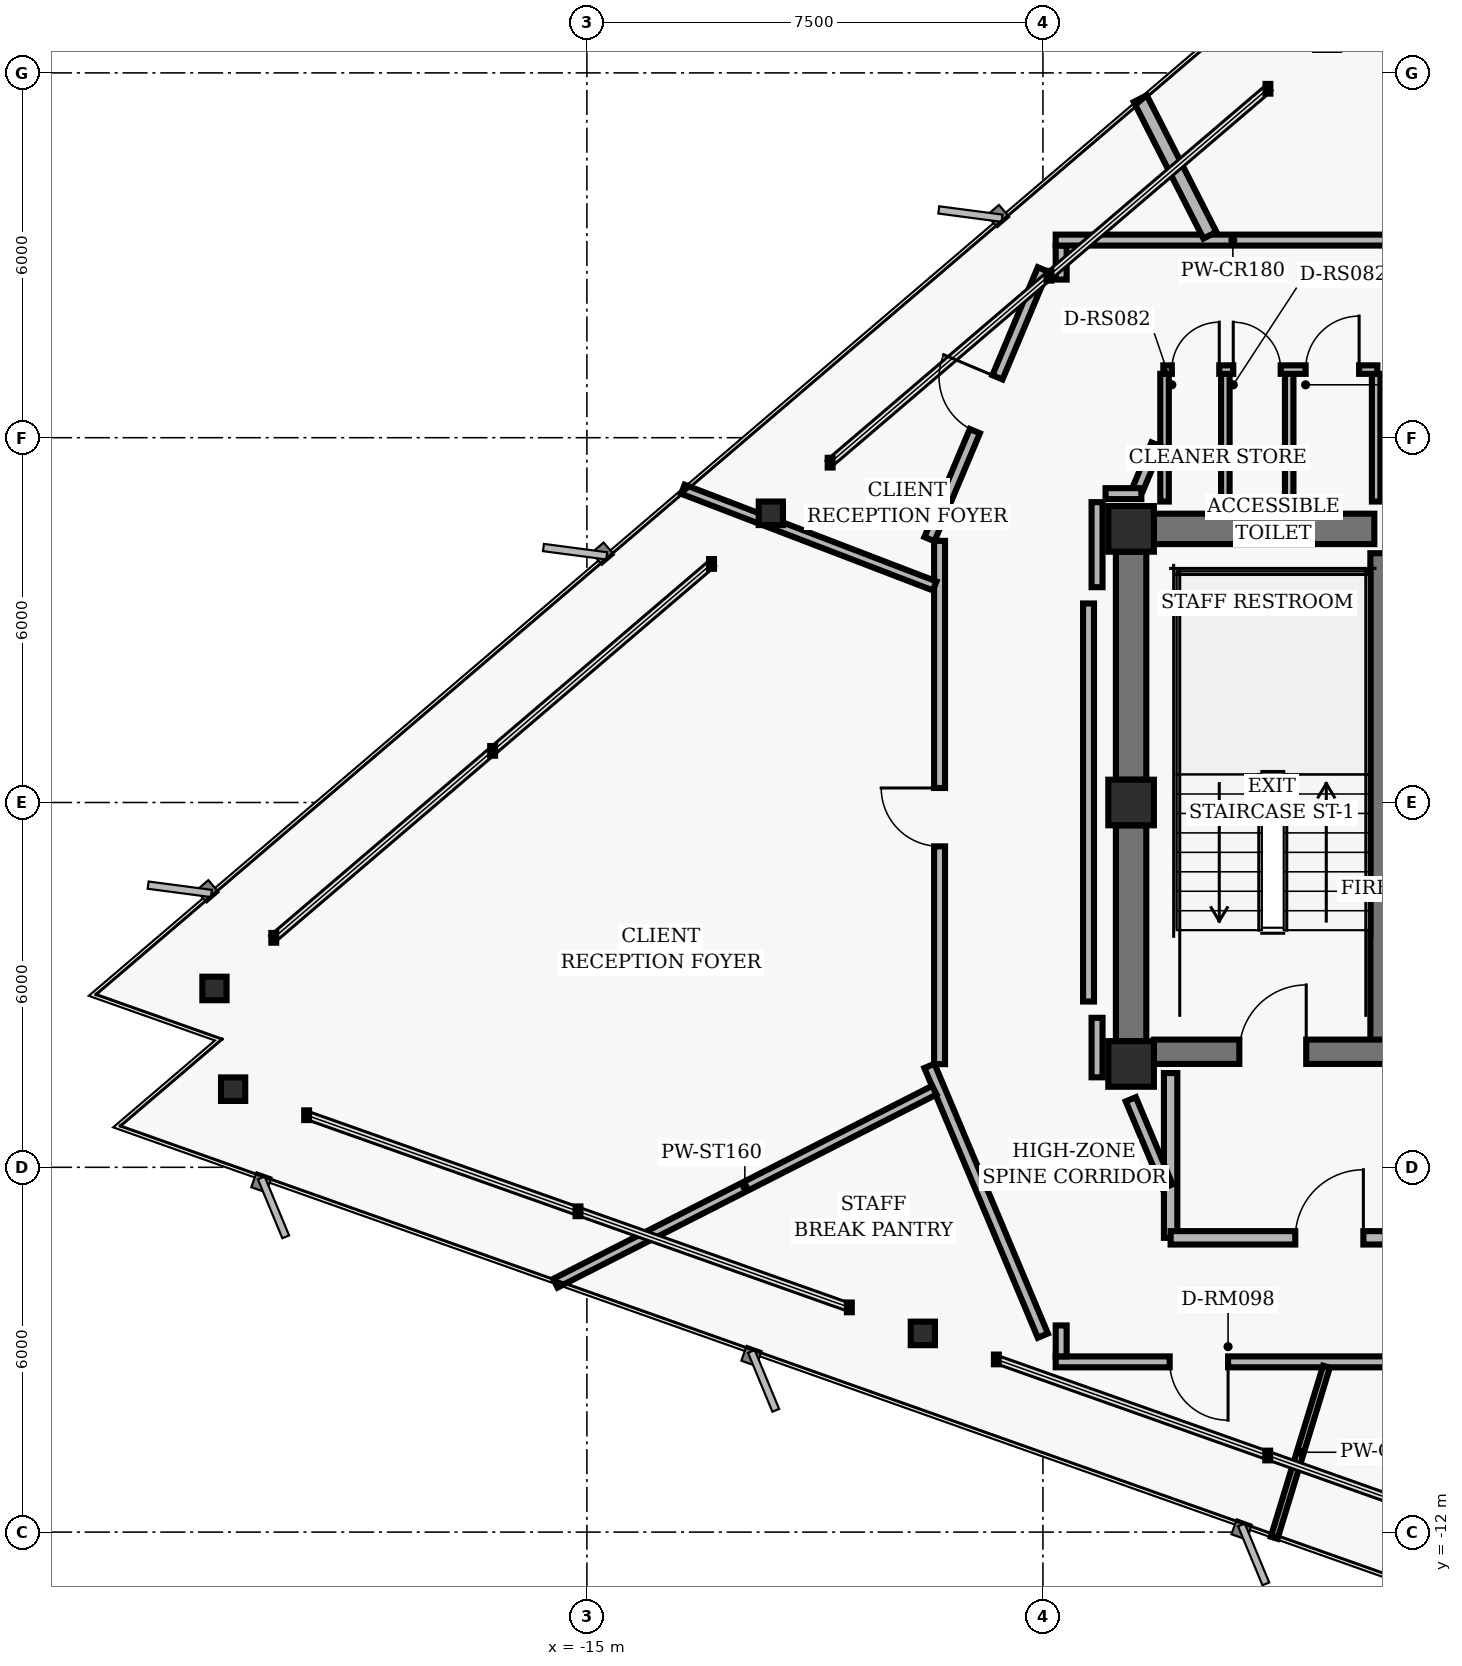
"""IFC4 building model, lengths in metres.
Left out: names, types, materials, properties, quantities, classifications, styles, units other than length and angle.
Written with IfcOpenShell. Run it as: python <this file> out.ifc"""

import sys

from ifc_helpers import new_model, si_unit, direction, frame, frame_2d, origin, origin_2d, place, context, subcontext, project, spatial, rectangle, hollow_rectangle, i_section, extrude, element, fill, save


model = new_model("IFC4")
c1 = context("Model", 3, precision=1e-05, world=origin(), true_north=direction((0.0, 1.0)))
c2 = subcontext(c1, "Body", "Model", "MODEL_VIEW")
j1 = project(units=[si_unit("LENGTHUNIT", "METRE"), si_unit("PLANEANGLEUNIT", "RADIAN")], contexts=[c1])
p1 = place(None, origin())
s1 = spatial("IfcSite", under=j1, at=p1, CompositionType="ELEMENT")
p2 = place(p1, origin())
s2 = spatial("IfcBuilding", under=s1, at=p2, CompositionType="ELEMENT")
p3 = place(p2, frame((0.0, 0.0, 181.44)))
s3 = spatial("IfcBuildingStorey", under=s2, at=p3, CompositionType="ELEMENT", Elevation=181.44)
for number, where, z_axis, x_axis in (
    (1, (-6.05, 4.5, 0.0), (0.0, 0.0, 1.0), (1.0, 0.0, 0.0)),
    (2, (-6.05, 0.0, 0.0), (0.0, 0.0, 1.0), (1.0, 0.0, 0.0)),
    (3, (-6.05, -4.3, 0.0), (0.0, 0.0, 1.0), (1.0, 0.0, 0.0)),
):
    element("IfcColumn", number, at=place(p3, frame(where, z_axis=z_axis, x_axis=x_axis)), inside=s3, PredefinedType="COLUMN", context=c2, shape_type="SweptSolid", body=[
        extrude(hollow_rectangle(XDim=0.75, YDim=0.75, WallThickness=0.05, InnerFilletRadius=0.02, OuterFilletRadius=0.04, at=origin_2d()), origin(), (0.0, 0.0, 1.0), 3.04),
    ])
p4 = place(p3, frame((-6.05, 0.375, 0.0), z_axis=(0.0, 0.0, 1.0), x_axis=(0.0, 1.0, 0.0)))
e4 = element("IfcWall", 4, at=p4, inside=s3, PredefinedType="SHEAR", context=c2, shape_type="SweptSolid", body=[
    extrude(rectangle(XDim=3.75, YDim=0.5, at=frame_2d((1.875, 0.0))), origin(), (0.0, 0.0, 1.0), 2.798),
])
p5 = place(p3, frame((-6.05, -3.925, 0.0), z_axis=(0.0, 0.0, 1.0), x_axis=(0.0, 1.0, 0.0)))
e5 = element("IfcWall", 5, at=p5, inside=s3, PredefinedType="SHEAR", context=c2, shape_type="SweptSolid", body=[
    extrude(rectangle(XDim=3.55, YDim=0.5, at=frame_2d((1.775, 0.0))), origin(), (0.0, 0.0, 1.0), 2.798),
])
p6 = place(p3, frame((-1.94, -4.1, 0.0), z_axis=(0.0, 0.0, 1.0), x_axis=(0.0, 1.0, 0.0)))
e6 = element("IfcWall", 6, at=p6, inside=s3, PredefinedType="SHEAR", context=c2, shape_type="SweptSolid", body=[
    extrude(rectangle(XDim=8.2, YDim=0.35, at=frame_2d((4.1, 0.0))), origin(), (0.0, 0.0, 1.0), 2.798),
])
p7 = place(p3, frame((-5.675, -4.1, 0.0), z_axis=(0.0, 0.0, 1.0), x_axis=(1.0, 0.0, 0.0)))
e7 = element("IfcWall", 7, at=p7, inside=s3, PredefinedType="SHEAR", context=c2, shape_type="SweptSolid", body=[
    extrude(rectangle(XDim=11.35, YDim=0.4, at=frame_2d((5.675, 0.0))), origin(), (0.0, 0.0, 1.0), 2.798),
])
p8 = place(p7, frame((1.405, 0.0, 0.0)))
e8 = element("IfcOpeningElement", 8, at=p8, cuts=e7, PredefinedType="OPENING", context=c2, shape_type="SweptSolid", body=[
    extrude(rectangle(XDim=1.1, YDim=2.04, at=frame_2d((0.55, 1.02))), frame((0.0, 0.21, 0.0), z_axis=(0.0, -1.0, 0.0), x_axis=(1.0, 0.0, 0.0)), (0.0, 0.0, 1.0), 0.42),
])
p9 = place(p7, frame((8.845, 0.0, 0.0)))
e9 = element("IfcOpeningElement", 9, at=p9, cuts=e7, PredefinedType="OPENING", context=c2, shape_type="SweptSolid", body=[
    extrude(rectangle(XDim=1.1, YDim=2.04, at=frame_2d((0.55, 1.02))), frame((0.0, 0.21, 0.0), z_axis=(0.0, -1.0, 0.0), x_axis=(1.0, 0.0, 0.0)), (0.0, 0.0, 1.0), 0.42),
])
p10 = place(p7, frame((4.145, 0.0, 0.0)))
e10 = element("IfcOpeningElement", 10, at=p10, cuts=e7, PredefinedType="OPENING", context=c2, shape_type="SweptSolid", body=[
    extrude(rectangle(XDim=1.06, YDim=2.04, at=frame_2d((0.53, 1.02))), frame((0.0, 0.21, 0.0), z_axis=(0.0, -1.0, 0.0), x_axis=(1.0, 0.0, 0.0)), (0.0, 0.0, 1.0), 0.42),
])
p11 = place(p7, frame((6.145, 0.0, 0.0)))
e11 = element("IfcOpeningElement", 11, at=p11, cuts=e7, PredefinedType="OPENING", context=c2, shape_type="SweptSolid", body=[
    extrude(rectangle(XDim=1.06, YDim=2.04, at=frame_2d((0.53, 1.02))), frame((0.0, 0.21, 0.0), z_axis=(0.0, -1.0, 0.0), x_axis=(1.0, 0.0, 0.0)), (0.0, 0.0, 1.0), 0.42),
])
p12 = place(p3, frame((-5.675, 4.5, 0.0), z_axis=(0.0, 0.0, 1.0), x_axis=(1.0, 0.0, 0.0)))
e12 = element("IfcWall", 12, at=p12, inside=s3, PredefinedType="SHEAR", context=c2, shape_type="SweptSolid", body=[
    extrude(rectangle(XDim=3.625, YDim=0.5, at=frame_2d((1.812, 0.0))), origin(), (0.0, 0.0, 1.0), 2.798),
])
for number, where, z_axis, x_axis in (
    (13, (-11.975, 4.757, 0.0), (0.0, 0.0, 1.0), (1.0, 0.0, 0.0)),
    (14, (-21.125, -3.059, 0.0), (0.0, 0.0, 1.0), (1.0, 0.0, 0.0)),
    (15, (-20.818, -4.715, 0.0), (0.0, 0.0, 1.0), (1.0, 0.0, 0.0)),
    (16, (-9.475, -8.732, 0.0), (0.0, 0.0, 1.0), (1.0, 0.0, 0.0)),
):
    element("IfcColumn", number, at=place(p3, frame(where, z_axis=z_axis, x_axis=x_axis)), inside=s3, PredefinedType="COLUMN", context=c2, shape_type="SweptSolid", body=[
        extrude(i_section(OverallWidth=0.398, OverallDepth=0.387, WebThickness=0.021, FlangeThickness=0.033, FilletRadius=0.018, at=origin_2d()), origin(), (0.0, 0.0, 1.0), 3.04),
    ])
p13 = place(p3, frame((-5.4, -7.16, 0.0), z_axis=(0.0, 0.0, 1.0), x_axis=(0.0, 1.0, 0.0)))
e17 = element("IfcWall", 17, at=p13, inside=s3, PredefinedType="PARTITIONING", context=c2, shape_type="SweptSolid", body=[
    extrude(rectangle(XDim=2.71, YDim=0.22, at=frame_2d((1.355, 0.0))), origin(), (0.0, 0.0, 1.0), 2.773),
])
p14 = place(p3, frame((-5.4, -7.16, 0.0), z_axis=(0.0, 0.0, 1.0), x_axis=(1.0, 0.0, 0.0)))
e18 = element("IfcWall", 18, at=p14, inside=s3, PredefinedType="PARTITIONING", context=c2, shape_type="SweptSolid", body=[
    extrude(rectangle(XDim=5.4, YDim=0.22, at=frame_2d((2.7, 0.0))), origin(), (0.0, 0.0, 1.0), 2.395),
])
p15 = place(p14, frame((2.05, 0.0, 0.0)))
e19 = element("IfcOpeningElement", 19, at=p15, cuts=e18, PredefinedType="OPENING", context=c2, shape_type="SweptSolid", body=[
    extrude(rectangle(XDim=1.12, YDim=2.02, at=frame_2d((0.56, 1.01))), frame((0.0, 0.12, 0.0), z_axis=(0.0, -1.0, 0.0), x_axis=(1.0, 0.0, 0.0)), (0.0, 0.0, 1.0), 0.24),
])
for number, where, z_axis, x_axis in (
    (20, (-5.5, 4.95, 0.0), (0.0, 0.0, 1.0), (0.0, 1.0, 0.0)),
    (21, (-4.5, 4.95, 0.0), (0.0, 0.0, 1.0), (0.0, 1.0, 0.0)),
    (22, (-3.45, 4.95, 0.0), (0.0, 0.0, 1.0), (0.0, 1.0, 0.0)),
    (23, (-2.02, 4.95, 0.0), (0.0, 0.0, 1.0), (0.0, 1.0, 0.0)),
):
    element("IfcWall", number, at=place(p3, frame(where, z_axis=z_axis, x_axis=x_axis)), inside=s3, PredefinedType="PARTITIONING", context=c2, shape_type="SweptSolid", body=[
        extrude(rectangle(XDim=2.1, YDim=0.14, at=frame_2d((1.05, 0.0))), origin(), (0.0, 0.0, 1.0), 2.773),
    ])
p16 = place(p3, frame((-5.52, 7.12, 0.0), z_axis=(0.0, 0.0, 1.0), x_axis=(1.0, 0.0, 0.0)))
e24 = element("IfcWall", 24, at=p16, inside=s3, PredefinedType="PARTITIONING", context=c2, shape_type="SweptSolid", body=[
    extrude(rectangle(XDim=3.52, YDim=0.14, at=frame_2d((1.76, 0.0))), origin(), (0.0, 0.0, 1.0), 2.773),
])
p17 = place(p16, frame((0.14, 0.0, 0.0)))
e25 = element("IfcOpeningElement", 25, at=p17, cuts=e24, PredefinedType="OPENING", context=c2, shape_type="SweptSolid", body=[
    extrude(rectangle(XDim=0.78, YDim=2.01, at=frame_2d((0.39, 1.005))), frame((0.0, 0.08, 0.0), z_axis=(0.0, -1.0, 0.0), x_axis=(1.0, 0.0, 0.0)), (0.0, 0.0, 1.0), 0.16),
])
p18 = place(p16, frame((1.15, 0.0, 0.0)))
e26 = element("IfcOpeningElement", 26, at=p18, cuts=e24, PredefinedType="OPENING", context=c2, shape_type="SweptSolid", body=[
    extrude(rectangle(XDim=0.78, YDim=2.01, at=frame_2d((0.39, 1.005))), frame((0.0, 0.08, 0.0), z_axis=(0.0, -1.0, 0.0), x_axis=(1.0, 0.0, 0.0)), (0.0, 0.0, 1.0), 0.16),
])
p19 = place(p16, frame((2.34, 0.0, 0.0)))
e27 = element("IfcOpeningElement", 27, at=p19, cuts=e24, PredefinedType="OPENING", context=c2, shape_type="SweptSolid", body=[
    extrude(rectangle(XDim=0.88, YDim=2.02, at=frame_2d((0.44, 1.01))), frame((0.0, 0.08, 0.0), z_axis=(0.0, -1.0, 0.0), x_axis=(1.0, 0.0, 0.0)), (0.0, 0.0, 1.0), 0.16),
])
p20 = place(p3, frame((-7.501, -8.769, 0.0), z_axis=(0.0, 0.0, 1.0), x_axis=(-0.387573945081, 0.921838617706, 0.0)))
e28 = element("IfcWall", 28, at=p20, inside=s3, PredefinedType="PARTITIONING", context=c2, shape_type="SweptSolid", body=[
    extrude(rectangle(XDim=4.813, YDim=0.18, at=frame_2d((2.407, 0.0))), origin(), (0.0, 0.0, 1.0), 2.773),
])
p21 = place(p3, frame((-9.2, -4.303, 0.0), z_axis=(0.0, 0.0, 1.0), x_axis=(0.0, 1.0, 0.0)))
e29 = element("IfcWall", 29, at=p21, inside=s3, PredefinedType="PARTITIONING", context=c2, shape_type="SweptSolid", body=[
    extrude(rectangle(XDim=8.607, YDim=0.18, at=frame_2d((4.303, 0.0))), origin(), (0.0, 0.0, 1.0), 2.773),
])
p22 = place(p21, frame((3.582, 0.0, 0.0)))
e30 = element("IfcOpeningElement", 30, at=p22, cuts=e29, PredefinedType="OPENING", context=c2, shape_type="SweptSolid", body=[
    extrude(rectangle(XDim=0.96, YDim=2.02, at=frame_2d((0.48, 1.01))), frame((0.0, 0.1, 0.0), z_axis=(0.0, -1.0, 0.0), x_axis=(1.0, 0.0, 0.0)), (0.0, 0.0, 1.0), 0.2),
])
p23 = place(p3, frame((-9.367, 4.332, 0.0), z_axis=(0.0, 0.0, 1.0), x_axis=(0.387573945081, 0.921838617706, 0.0)))
e31 = element("IfcWall", 31, at=p23, inside=s3, PredefinedType="PARTITIONING", context=c2, shape_type="SweptSolid", body=[
    extrude(rectangle(XDim=4.813, YDim=0.18, at=frame_2d((2.407, 0.0))), origin(), (0.0, 0.0, 1.0), 2.395),
])
p24 = place(p23, frame((1.927, 0.0, 0.0)))
e32 = element("IfcOpeningElement", 32, at=p24, cuts=e31, PredefinedType="OPENING", context=c2, shape_type="SweptSolid", body=[
    extrude(rectangle(XDim=0.96, YDim=2.02, at=frame_2d((0.48, 1.01))), frame((0.0, 0.1, 0.0), z_axis=(0.0, -1.0, 0.0), x_axis=(1.0, 0.0, 0.0)), (0.0, 0.0, 1.0), 0.2),
])
p25 = place(p3, frame((-7.2, 8.601, 0.0), z_axis=(0.0, 0.0, 1.0), x_axis=(0.0, 1.0, 0.0)))
e33 = element("IfcWall", 33, at=p25, inside=s3, PredefinedType="PARTITIONING", context=c2, shape_type="SweptSolid", body=[
    extrude(rectangle(XDim=0.559, YDim=0.18, at=frame_2d((0.28, 0.0))), origin(), (0.0, 0.0, 1.0), 2.773),
])
p26 = place(p3, frame((-7.29, 9.25, 0.0), z_axis=(0.0, 0.0, 1.0), x_axis=(1.0, 0.0, 0.0)))
e34 = element("IfcWall", 34, at=p26, inside=s3, PredefinedType="PARTITIONING", context=c2, shape_type="SweptSolid", body=[
    extrude(rectangle(XDim=13.3, YDim=0.18, at=frame_2d((6.65, 0.0))), origin(), (0.0, 0.0, 1.0), 2.773),
])
p27 = place(p26, frame((11.113, 0.0, 0.0)))
e35 = element("IfcOpeningElement", 35, at=p27, cuts=e34, PredefinedType="OPENING", context=c2, shape_type="SweptSolid", body=[
    extrude(rectangle(XDim=0.96, YDim=2.02, at=frame_2d((0.48, 1.01))), frame((0.0, 0.1, 0.0), z_axis=(0.0, -1.0, 0.0), x_axis=(1.0, 0.0, 0.0)), (0.0, 0.0, 1.0), 0.2),
])
p28 = place(p26, frame((5.827, 0.0, 0.0)))
e36 = element("IfcOpeningElement", 36, at=p28, cuts=e34, PredefinedType="OPENING", context=c2, shape_type="SweptSolid", body=[
    extrude(rectangle(XDim=1.02, YDim=2.02, at=frame_2d((0.51, 1.01))), frame((0.0, 0.1, 0.0), z_axis=(0.0, -1.0, 0.0), x_axis=(1.0, 0.0, 0.0)), (0.0, 0.0, 1.0), 0.2),
])
p29 = place(p3, frame((-5.632, 5.887, 0.0), z_axis=(0.0, 0.0, 1.0), x_axis=(-0.387792833522, -0.921746558588, 0.0)))
e37 = element("IfcWall", 37, at=p29, inside=s3, PredefinedType="PARTITIONING", context=c2, shape_type="SweptSolid", body=[
    extrude(rectangle(XDim=0.785, YDim=0.18, at=frame_2d((0.393, 0.0))), origin(), (0.0, 0.0, 1.0), 2.773),
])
p30 = place(p3, frame((-5.881, 5.08, 0.0), z_axis=(0.0, 0.0, 1.0), x_axis=(-1.0, 0.0, 0.0)))
e38 = element("IfcWall", 38, at=p30, inside=s3, PredefinedType="PARTITIONING", context=c2, shape_type="SweptSolid", body=[
    extrude(rectangle(XDim=0.589, YDim=0.18, at=frame_2d((0.294, 0.0))), origin(), (0.0, 0.0, 1.0), 2.773),
])
p31 = place(p3, frame((-6.61, 4.94, 0.0), z_axis=(0.0, 0.0, 1.0), x_axis=(0.0, -1.0, 0.0)))
e39 = element("IfcWall", 39, at=p31, inside=s3, PredefinedType="PARTITIONING", context=c2, shape_type="SweptSolid", body=[
    extrude(rectangle(XDim=1.399, YDim=0.18, at=frame_2d((0.699, 0.0))), origin(), (0.0, 0.0, 1.0), 2.773),
])
p32 = place(p3, frame((-6.75, 3.273, 0.0), z_axis=(0.0, 0.0, 1.0), x_axis=(0.0, -1.0, 0.0)))
e40 = element("IfcWall", 40, at=p32, inside=s3, PredefinedType="PARTITIONING", context=c2, shape_type="SweptSolid", body=[
    extrude(rectangle(XDim=6.547, YDim=0.18, at=frame_2d((3.273, 0.0))), origin(), (0.0, 0.0, 1.0), 2.773),
])
p33 = place(p3, frame((-6.61, -3.541, 0.0), z_axis=(0.0, 0.0, 1.0), x_axis=(0.0, -1.0, 0.0)))
e41 = element("IfcWall", 41, at=p33, inside=s3, PredefinedType="PARTITIONING", context=c2, shape_type="SweptSolid", body=[
    extrude(rectangle(XDim=0.979, YDim=0.18, at=frame_2d((0.489, 0.0))), origin(), (0.0, 0.0, 1.0), 2.773),
])
p34 = place(p3, frame((-6.055, -4.882, 0.0), z_axis=(0.0, 0.0, 1.0), x_axis=(0.387579540458, -0.921836265189, 0.0)))
e42 = element("IfcWall", 42, at=p34, inside=s3, PredefinedType="PARTITIONING", context=c2, shape_type="SweptSolid", body=[
    extrude(rectangle(XDim=1.555, YDim=0.18, at=frame_2d((0.777, 0.0))), origin(), (0.0, 0.0, 1.0), 2.773),
])
p35 = place(p3, frame((6.01, -9.2, 0.0), z_axis=(0.0, 0.0, 1.0), x_axis=(-1.0, 0.0, 0.0)))
e43 = element("IfcWall", 43, at=p35, inside=s3, PredefinedType="PARTITIONING", context=c2, shape_type="SweptSolid", body=[
    extrude(rectangle(XDim=13.3, YDim=0.18, at=frame_2d((6.65, 0.0))), origin(), (0.0, 0.0, 1.0), 2.395),
])
p36 = place(p35, frame((10.465, 0.0, 0.0)))
e44 = element("IfcOpeningElement", 44, at=p36, cuts=e43, PredefinedType="OPENING", context=c2, shape_type="SweptSolid", body=[
    extrude(rectangle(XDim=0.96, YDim=2.02, at=frame_2d((0.48, 1.01))), frame((0.0, 0.1, 0.0), z_axis=(0.0, -1.0, 0.0), x_axis=(1.0, 0.0, 0.0)), (0.0, 0.0, 1.0), 0.2),
])
p37 = place(p35, frame((4.373, 0.0, 0.0)))
e45 = element("IfcOpeningElement", 45, at=p37, cuts=e43, PredefinedType="OPENING", context=c2, shape_type="SweptSolid", body=[
    extrude(rectangle(XDim=0.96, YDim=2.02, at=frame_2d((0.48, 1.01))), frame((0.0, 0.1, 0.0), z_axis=(0.0, -1.0, 0.0), x_axis=(1.0, 0.0, 0.0)), (0.0, 0.0, 1.0), 0.2),
])
p38 = place(p3, frame((-7.2, -9.11, 0.0), z_axis=(0.0, 0.0, 1.0), x_axis=(0.0, 1.0, 0.0)))
e46 = element("IfcWall", 46, at=p38, inside=s3, PredefinedType="PARTITIONING", context=c2, shape_type="SweptSolid", body=[
    extrude(rectangle(XDim=0.51, YDim=0.18, at=frame_2d((0.255, 0.0))), origin(), (0.0, 0.0, 1.0), 2.773),
])
p39 = place(p3, frame((-9.286, -4.731, 0.0), z_axis=(0.0, 0.0, 1.0), x_axis=(-0.891002207928, -0.453998970778, 0.0)))
e47 = element("IfcWall", 47, at=p39, inside=s3, PredefinedType="PARTITIONING", context=c2, shape_type="SweptSolid", body=[
    extrude(rectangle(XDim=6.996, YDim=0.16, at=frame_2d((3.498, 0.0))), origin(), (0.0, 0.0, 1.0), 2.773),
])
p40 = place(p3, frame((-2.837, -9.28, 0.0), z_axis=(0.0, 0.0, 1.0), x_axis=(-0.292353462598, -0.95631033295, 0.0)))
e48 = element("IfcWall", 48, at=p40, inside=s3, PredefinedType="MOVABLE", context=c2, shape_type="SweptSolid", body=[
    extrude(rectangle(XDim=2.942, YDim=0.115, at=frame_2d((1.471, 0.0))), origin(), (0.0, 0.0, 1.0), 2.773),
])
p41 = place(p3, frame((-4.754, 9.33, 0.0), z_axis=(0.0, 0.0, 1.0), x_axis=(-0.453977993214, 0.891012896471, 0.0)))
e49 = element("IfcWall", 49, at=p41, inside=s3, PredefinedType="PARTITIONING", context=c2, shape_type="SweptSolid", body=[
    extrude(rectangle(XDim=2.522, YDim=0.24, at=frame_2d((1.261, 0.0))), origin(), (0.0, 0.0, 1.0), 2.773),
])
p42 = place(p3, frame((-9.28, 3.562, 0.0), z_axis=(0.0, 0.0, 1.0), x_axis=(-0.933582300371, 0.3583630679, 0.0)))
e50 = element("IfcWall", 50, at=p42, inside=s3, PredefinedType="PARTITIONING", context=c2, shape_type="SweptSolid", body=[
    extrude(rectangle(XDim=4.436, YDim=0.16, at=frame_2d((2.218, 0.0))), origin(), (0.0, 0.0, 1.0), 2.773),
])
p43 = place(p8, origin())
e51 = element("IfcDoor", 51, at=p43, inside=s3, OperationType="SINGLE_SWING_RIGHT", PredefinedType="DOOR", context=c2, shape_type="SweptSolid", body=[
    extrude(rectangle(XDim=1.1, YDim=2.04, at=frame_2d((0.55, 1.02))), frame((0.0, 0.025, 0.0), z_axis=(0.0, -1.0, 0.0), x_axis=(1.0, 0.0, 0.0)), (0.0, 0.0, 1.0), 0.05),
])
fill(e8, e51)
p44 = place(p15, origin())
e52 = element("IfcDoor", 52, at=p44, inside=s3, OperationType="SINGLE_SWING_RIGHT", PredefinedType="DOOR", context=c2, shape_type="SweptSolid", body=[
    extrude(rectangle(XDim=1.12, YDim=2.02, at=frame_2d((0.56, 1.01))), frame((0.0, 0.025, 0.0), z_axis=(0.0, -1.0, 0.0), x_axis=(1.0, 0.0, 0.0)), (0.0, 0.0, 1.0), 0.05),
])
fill(e19, e52)
p45 = place(p17, origin())
e53 = element("IfcDoor", 53, at=p45, inside=s3, OperationType="SINGLE_SWING_RIGHT", PredefinedType="DOOR", context=c2, shape_type="SweptSolid", body=[
    extrude(rectangle(XDim=0.78, YDim=2.01, at=frame_2d((0.39, 1.005))), frame((0.0, 0.025, 0.0), z_axis=(0.0, -1.0, 0.0), x_axis=(1.0, 0.0, 0.0)), (0.0, 0.0, 1.0), 0.05),
])
fill(e25, e53)
p46 = place(p18, origin())
e54 = element("IfcDoor", 54, at=p46, inside=s3, OperationType="SINGLE_SWING_LEFT", PredefinedType="DOOR", context=c2, shape_type="SweptSolid", body=[
    extrude(rectangle(XDim=0.78, YDim=2.01, at=frame_2d((0.39, 1.005))), frame((0.0, 0.025, 0.0), z_axis=(0.0, -1.0, 0.0), x_axis=(1.0, 0.0, 0.0)), (0.0, 0.0, 1.0), 0.05),
])
fill(e26, e54)
p47 = place(p19, origin())
e55 = element("IfcDoor", 55, at=p47, inside=s3, OperationType="SINGLE_SWING_RIGHT", PredefinedType="DOOR", context=c2, shape_type="SweptSolid", body=[
    extrude(rectangle(XDim=0.88, YDim=2.02, at=frame_2d((0.44, 1.01))), frame((0.0, 0.025, 0.0), z_axis=(0.0, -1.0, 0.0), x_axis=(1.0, 0.0, 0.0)), (0.0, 0.0, 1.0), 0.05),
])
fill(e27, e55)
p48 = place(p22, origin())
e56 = element("IfcDoor", 56, at=p48, inside=s3, OperationType="SINGLE_SWING_RIGHT", PredefinedType="DOOR", context=c2, shape_type="SweptSolid", body=[
    extrude(rectangle(XDim=0.96, YDim=2.02, at=frame_2d((0.48, 1.01))), frame((0.0, 0.025, 0.0), z_axis=(0.0, -1.0, 0.0), x_axis=(1.0, 0.0, 0.0)), (0.0, 0.0, 1.0), 0.05),
])
fill(e30, e56)
p49 = place(p36, origin())
e57 = element("IfcDoor", 57, at=p49, inside=s3, OperationType="SINGLE_SWING_LEFT", PredefinedType="DOOR", context=c2, shape_type="SweptSolid", body=[
    extrude(rectangle(XDim=0.96, YDim=2.02, at=frame_2d((0.48, 1.01))), frame((0.0, 0.025, 0.0), z_axis=(0.0, -1.0, 0.0), x_axis=(1.0, 0.0, 0.0)), (0.0, 0.0, 1.0), 0.05),
])
fill(e44, e57)
p50 = place(p24, origin())
e58 = element("IfcDoor", 58, at=p50, inside=s3, OperationType="SINGLE_SWING_RIGHT", PredefinedType="DOOR", context=c2, shape_type="SweptSolid", body=[
    extrude(rectangle(XDim=0.96, YDim=2.02, at=frame_2d((0.48, 1.01))), frame((0.0, 0.025, 0.0), z_axis=(0.0, -1.0, 0.0), x_axis=(1.0, 0.0, 0.0)), (0.0, 0.0, 1.0), 0.05),
])
fill(e32, e58)
save(model, sys.argv[1])
